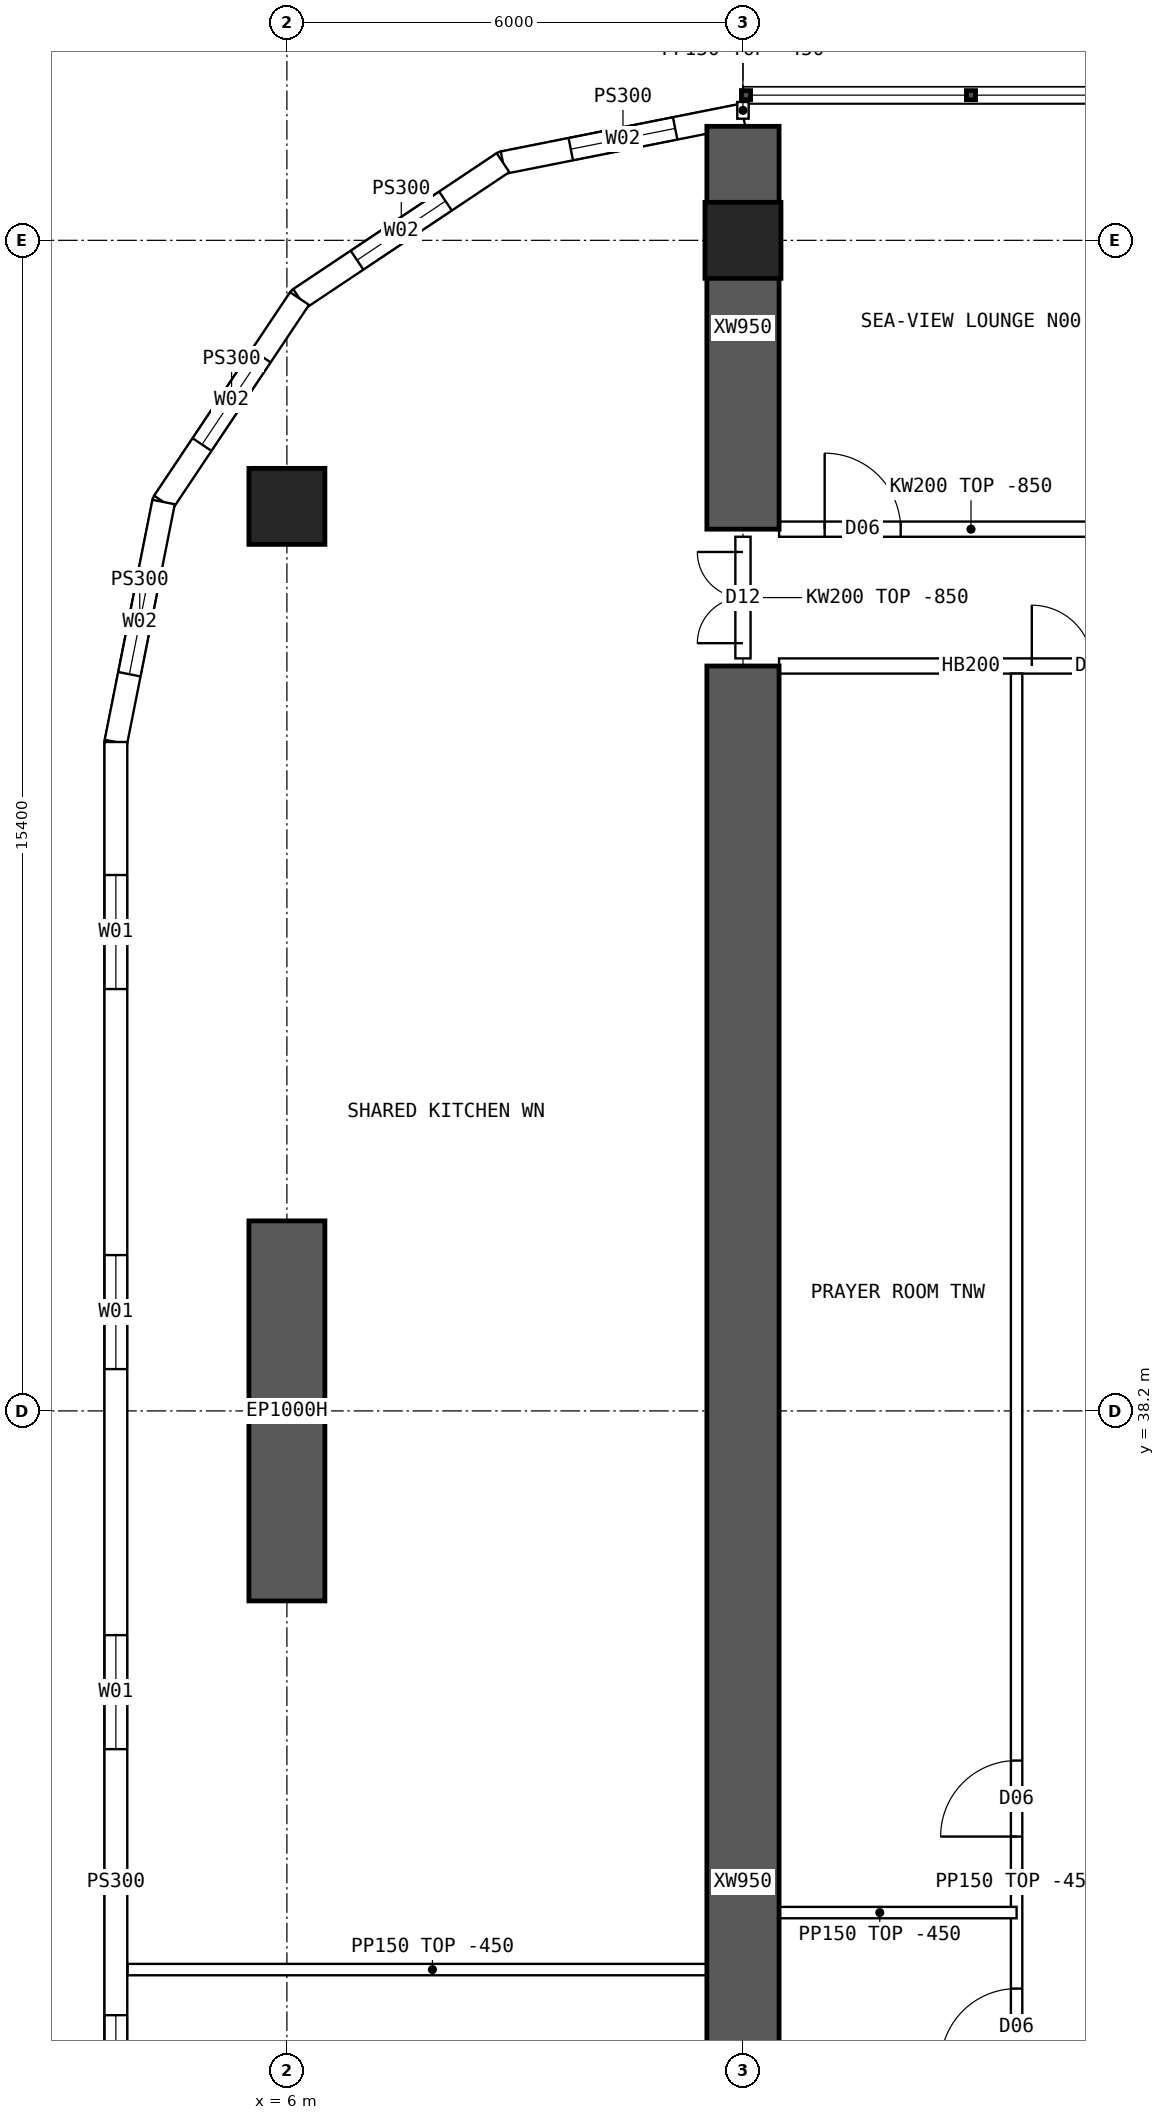
"""IFC4 building model, lengths in metres.
Left out: names, types, materials, properties, quantities, classifications, styles, units other than length and angle.
Written with IfcOpenShell. Run it as: python <this file> out.ifc"""

import sys

from ifc_helpers import new_model, si_unit, direction, frame, frame_2d, origin, origin_2d, place, context, subcontext, project, spatial, polyline, rectangle, hollow_rectangle, outline, extrude, element, fill, save


model = new_model("IFC4")
c1 = context("Model", 3, precision=1e-05, world=origin(), true_north=direction((0.0, 1.0)))
c2 = subcontext(c1, "Body", "Model", "MODEL_VIEW")
j1 = project(units=[si_unit("LENGTHUNIT", "METRE"), si_unit("PLANEANGLEUNIT", "RADIAN")], contexts=[c1])
p1 = place(None, origin())
s1 = spatial("IfcSite", under=j1, at=p1, CompositionType="ELEMENT")
p2 = place(p1, origin())
s2 = spatial("IfcBuilding", under=s1, at=p2, CompositionType="ELEMENT")
p3 = place(p2, frame((0.0, 0.0, 95.65)))
s3 = spatial("IfcBuildingStorey", under=s2, at=p3, CompositionType="ELEMENT", Elevation=95.65)
for number, where, z_axis, x_axis in (
    (1, (12.0, 53.6, 0.0), (0.0, 0.0, 1.0), (1.0, 0.0, 0.0)),
    (2, (6.0, 50.1, 0.0), (0.0, 0.0, 1.0), (1.0, 0.0, 0.0)),
):
    element("IfcColumn", number, at=place(p3, frame(where, z_axis=z_axis, x_axis=x_axis)), inside=s3, PredefinedType="COLUMN", context=c2, shape_type="SweptSolid", body=[
        extrude(hollow_rectangle(XDim=1.0, YDim=1.0, WallThickness=0.1, at=origin_2d()), origin(), (0.0, 0.0, 1.0), 3.75),
    ])
p4 = place(p3, frame((6.0, 35.7, 0.0), z_axis=(0.0, 0.0, 1.0), x_axis=(0.0, 1.0, 0.0)))
e3 = element("IfcWall", 3, at=p4, inside=s3, PredefinedType="SHEAR", context=c2, shape_type="SweptSolid", body=[
    extrude(rectangle(XDim=5.0, YDim=1.0, at=frame_2d((2.5, 0.0))), origin(), (0.0, 0.0, 1.0), 3.75),
])
p5 = place(p3, frame((12.0, 49.8, 0.0), z_axis=(0.0, 0.0, 1.0), x_axis=(0.0, 1.0, 0.0)))
e4 = element("IfcWall", 4, at=p5, inside=s3, PredefinedType="SHEAR", context=c2, shape_type="SweptSolid", body=[
    extrude(rectangle(XDim=5.3, YDim=0.95, at=frame_2d((2.65, 0.0))), origin(), (0.0, 0.0, 1.0), 3.75),
])
p6 = place(p3, frame((12.0, 16.0, 0.0), z_axis=(0.0, 0.0, 1.0), x_axis=(0.0, 1.0, 0.0)))
e5 = element("IfcWall", 5, at=p6, inside=s3, PredefinedType="SHEAR", context=c2, shape_type="SweptSolid", body=[
    extrude(rectangle(XDim=32.0, YDim=0.95, at=frame_2d((16.0, 0.0))), origin(), (0.0, 0.0, 1.0), 3.75),
])
p7 = place(p3, frame((3.75, 47.0, 0.0), z_axis=(0.0, 0.0, 1.0), x_axis=(0.0, -1.0, 0.0)))
e6 = element("IfcWall", 6, at=p7, inside=s3, PredefinedType="SOLIDWALL", context=c2, shape_type="SweptSolid", body=[
    extrude(outline(polyline([(-0.015, -0.15), (30.015, -0.15), (29.985, 0.15), (0.015, 0.15), (-0.015, -0.15)])), origin(), (0.0, 0.0, 1.0), 3.3),
])
p8 = place(p7, frame((1.75, 0.0, 0.9)))
e7 = element("IfcOpeningElement", 7, at=p8, cuts=e6, PredefinedType="OPENING", context=c2, shape_type="SweptSolid", body=[
    extrude(rectangle(XDim=1.5, YDim=2.0, at=frame_2d((0.75, 1.0))), frame((0.0, 0.16, 0.0), z_axis=(0.0, -1.0, 0.0), x_axis=(1.0, 0.0, 0.0)), (0.0, 0.0, 1.0), 0.32),
])
p9 = place(p7, frame((6.75, 0.0, 0.9)))
e8 = element("IfcOpeningElement", 8, at=p9, cuts=e6, PredefinedType="OPENING", context=c2, shape_type="SweptSolid", body=[
    extrude(rectangle(XDim=1.5, YDim=2.0, at=frame_2d((0.75, 1.0))), frame((0.0, 0.16, 0.0), z_axis=(0.0, -1.0, 0.0), x_axis=(1.0, 0.0, 0.0)), (0.0, 0.0, 1.0), 0.32),
])
p10 = place(p7, frame((11.75, 0.0, 0.9)))
e9 = element("IfcOpeningElement", 9, at=p10, cuts=e6, PredefinedType="OPENING", context=c2, shape_type="SweptSolid", body=[
    extrude(rectangle(XDim=1.5, YDim=2.0, at=frame_2d((0.75, 1.0))), frame((0.0, 0.16, 0.0), z_axis=(0.0, -1.0, 0.0), x_axis=(1.0, 0.0, 0.0)), (0.0, 0.0, 1.0), 0.32),
])
p11 = place(p7, frame((16.75, 0.0, 0.9)))
e10 = element("IfcOpeningElement", 10, at=p11, cuts=e6, PredefinedType="OPENING", context=c2, shape_type="SweptSolid", body=[
    extrude(rectangle(XDim=1.5, YDim=2.0, at=frame_2d((0.75, 1.0))), frame((0.0, 0.16, 0.0), z_axis=(0.0, -1.0, 0.0), x_axis=(1.0, 0.0, 0.0)), (0.0, 0.0, 1.0), 0.32),
])
p12 = place(p7, frame((21.75, 0.0, 0.9)))
e11 = element("IfcOpeningElement", 11, at=p12, cuts=e6, PredefinedType="OPENING", context=c2, shape_type="SweptSolid", body=[
    extrude(rectangle(XDim=1.5, YDim=2.0, at=frame_2d((0.75, 1.0))), frame((0.0, 0.16, 0.0), z_axis=(0.0, -1.0, 0.0), x_axis=(1.0, 0.0, 0.0)), (0.0, 0.0, 1.0), 0.32),
])
p13 = place(p7, frame((26.75, 0.0, 0.9)))
e12 = element("IfcOpeningElement", 12, at=p13, cuts=e6, PredefinedType="OPENING", context=c2, shape_type="SweptSolid", body=[
    extrude(rectangle(XDim=1.5, YDim=2.0, at=frame_2d((0.75, 1.0))), frame((0.0, 0.16, 0.0), z_axis=(0.0, -1.0, 0.0), x_axis=(1.0, 0.0, 0.0)), (0.0, 0.0, 1.0), 0.32),
])
p14 = place(p3, frame((12.0, 55.25, 0.0), z_axis=(0.0, 0.0, 1.0), x_axis=(-0.980787251524, -0.195080412259, 0.0)))
e13 = element("IfcWall", 13, at=p14, inside=s3, PredefinedType="SOLIDWALL", context=c2, shape_type="SweptSolid", body=[
    extrude(outline(polyline([(-0.03, -0.15), (3.249, -0.15), (3.189, 0.15), (0.03, 0.15), (-0.03, -0.15)])), origin(), (0.0, 0.0, 1.0), 3.3),
])
p15 = place(p14, frame((0.909, 0.0, 0.9)))
e14 = element("IfcOpeningElement", 14, at=p15, cuts=e13, PredefinedType="OPENING", context=c2, shape_type="SweptSolid", body=[
    extrude(rectangle(XDim=1.4, YDim=1.8, at=frame_2d((0.7, 0.9))), frame((0.0, 0.16, 0.0), z_axis=(0.0, -1.0, 0.0), x_axis=(1.0, 0.0, 0.0)), (0.0, 0.0, 1.0), 0.32),
])
p16 = place(p3, frame((8.843, 54.622, 0.0), z_axis=(0.0, 0.0, 1.0), x_axis=(-0.831443069936, -0.555609954424, 0.0)))
e15 = element("IfcWall", 15, at=p16, inside=s3, PredefinedType="SOLIDWALL", context=c2, shape_type="SweptSolid", body=[
    extrude(outline(polyline([(-0.03, -0.15), (3.249, -0.15), (3.189, 0.15), (0.03, 0.15), (-0.03, -0.15)])), origin(), (0.0, 0.0, 1.0), 3.3),
])
p17 = place(p16, frame((0.909, 0.0, 0.9)))
e16 = element("IfcOpeningElement", 16, at=p17, cuts=e15, PredefinedType="OPENING", context=c2, shape_type="SweptSolid", body=[
    extrude(rectangle(XDim=1.4, YDim=1.8, at=frame_2d((0.7, 0.9))), frame((0.0, 0.16, 0.0), z_axis=(0.0, -1.0, 0.0), x_axis=(1.0, 0.0, 0.0)), (0.0, 0.0, 1.0), 0.32),
])
p18 = place(p3, frame((6.167, 52.833, 0.0), z_axis=(0.0, 0.0, 1.0), x_axis=(-0.555609954424, -0.831443069936, 0.0)))
e17 = element("IfcWall", 17, at=p18, inside=s3, PredefinedType="SOLIDWALL", context=c2, shape_type="SweptSolid", body=[
    extrude(outline(polyline([(-0.03, -0.15), (3.249, -0.15), (3.189, 0.15), (0.03, 0.15), (-0.03, -0.15)])), origin(), (0.0, 0.0, 1.0), 3.3),
])
p19 = place(p18, frame((0.909, 0.0, 0.9)))
e18 = element("IfcOpeningElement", 18, at=p19, cuts=e17, PredefinedType="OPENING", context=c2, shape_type="SweptSolid", body=[
    extrude(rectangle(XDim=1.4, YDim=1.8, at=frame_2d((0.7, 0.9))), frame((0.0, 0.16, 0.0), z_axis=(0.0, -1.0, 0.0), x_axis=(1.0, 0.0, 0.0)), (0.0, 0.0, 1.0), 0.32),
])
p20 = place(p3, frame((4.378, 50.157, 0.0), z_axis=(0.0, 0.0, 1.0), x_axis=(-0.195080412259, -0.980787251524, 0.0)))
e19 = element("IfcWall", 19, at=p20, inside=s3, PredefinedType="SOLIDWALL", context=c2, shape_type="SweptSolid", body=[
    extrude(outline(polyline([(-0.03, -0.15), (3.234, -0.15), (3.204, 0.15), (0.03, 0.15), (-0.03, -0.15)])), origin(), (0.0, 0.0, 1.0), 3.3),
])
p21 = place(p20, frame((0.909, 0.0, 0.9)))
e20 = element("IfcOpeningElement", 20, at=p21, cuts=e19, PredefinedType="OPENING", context=c2, shape_type="SweptSolid", body=[
    extrude(rectangle(XDim=1.4, YDim=1.8, at=frame_2d((0.7, 0.9))), frame((0.0, 0.16, 0.0), z_axis=(0.0, -1.0, 0.0), x_axis=(1.0, 0.0, 0.0)), (0.0, 0.0, 1.0), 0.32),
])
p22 = place(p3, frame((12.475, 49.8, 0.0), z_axis=(0.0, 0.0, 1.0), x_axis=(1.0, 0.0, 0.0)))
e21 = element("IfcWall", 21, at=p22, inside=s3, PredefinedType="SOLIDWALL", context=c2, shape_type="SweptSolid", body=[
    extrude(outline(polyline([(0.0, 0.0), (5.05, 0.0), (5.05, 2.9), (0.0, 2.9), (0.0, 0.0)])), frame((0.0, 0.1, 0.0), z_axis=(0.0, -1.0, 0.0), x_axis=(1.0, 0.0, 0.0)), (0.0, 0.0, 1.0), 0.2),
])
p23 = place(p22, frame((0.6, 0.0, 0.0)))
e22 = element("IfcOpeningElement", 22, at=p23, cuts=e21, PredefinedType="OPENING", context=c2, shape_type="SweptSolid", body=[
    extrude(rectangle(XDim=1.0, YDim=2.1, at=frame_2d((0.5, 1.05))), frame((0.0, 0.11, 0.0), z_axis=(0.0, -1.0, 0.0), x_axis=(1.0, 0.0, 0.0)), (0.0, 0.0, 1.0), 0.22),
])
p24 = place(p3, frame((12.475, 48.0, 0.0), z_axis=(0.0, 0.0, 1.0), x_axis=(1.0, 0.0, 0.0)))
e23 = element("IfcWall", 23, at=p24, inside=s3, PredefinedType="SOLIDWALL", context=c2, shape_type="SweptSolid", body=[
    extrude(rectangle(XDim=5.05, YDim=0.2, at=frame_2d((2.525, 0.0))), origin(), (0.0, 0.0, 1.0), 3.3),
])
p25 = place(p24, frame((3.325, 0.0, 0.0)))
e24 = element("IfcOpeningElement", 24, at=p25, cuts=e23, PredefinedType="OPENING", context=c2, shape_type="SweptSolid", body=[
    extrude(rectangle(XDim=1.6, YDim=2.1, at=frame_2d((0.8, 1.05))), frame((0.0, 0.11, 0.0), z_axis=(0.0, -1.0, 0.0), x_axis=(1.0, 0.0, 0.0)), (0.0, 0.0, 1.0), 0.22),
])
p26 = place(p3, frame((15.6, 16.1, 0.0), z_axis=(0.0, 0.0, 1.0), x_axis=(0.0, 1.0, 0.0)))
e25 = element("IfcWall", 25, at=p26, inside=s3, PredefinedType="PARTITIONING", context=c2, shape_type="SweptSolid", body=[
    extrude(rectangle(XDim=31.8, YDim=0.15, at=frame_2d((15.9, 0.0))), origin(), (0.0, 0.0, 1.0), 3.3),
])
p27 = place(p26, frame((13.5, 0.0, 0.0)))
e26 = element("IfcOpeningElement", 26, at=p27, cuts=e25, PredefinedType="OPENING", context=c2, shape_type="SweptSolid", body=[
    extrude(rectangle(XDim=1.0, YDim=2.1, at=frame_2d((0.5, 1.05))), frame((0.0, 0.085, 0.0), z_axis=(0.0, -1.0, 0.0), x_axis=(1.0, 0.0, 0.0)), (0.0, 0.0, 1.0), 0.17),
])
p28 = place(p26, frame((16.5, 0.0, 0.0)))
e27 = element("IfcOpeningElement", 27, at=p28, cuts=e25, PredefinedType="OPENING", context=c2, shape_type="SweptSolid", body=[
    extrude(rectangle(XDim=1.0, YDim=2.1, at=frame_2d((0.5, 1.05))), frame((0.0, 0.085, 0.0), z_axis=(0.0, -1.0, 0.0), x_axis=(1.0, 0.0, 0.0)), (0.0, 0.0, 1.0), 0.17),
])
p29 = place(p3, frame((12.0, 31.6, 0.0), z_axis=(0.0, 0.0, 1.0), x_axis=(1.0, 0.0, 0.0)))
e28 = element("IfcWall", 28, at=p29, inside=s3, PredefinedType="PARTITIONING", context=c2, shape_type="SweptSolid", body=[
    extrude(rectangle(XDim=3.6, YDim=0.15, at=frame_2d((1.8, 0.0))), origin(), (0.0, 0.0, 1.0), 3.3),
])
p30 = place(p3, frame((3.905, 30.85, 0.0), z_axis=(0.0, 0.0, 1.0), x_axis=(1.0, 0.0, 0.0)))
e29 = element("IfcWall", 29, at=p30, inside=s3, PredefinedType="PARTITIONING", context=c2, shape_type="SweptSolid", body=[
    extrude(outline(polyline([(0.0, 0.0), (8.02, 0.0), (8.02, 3.3), (2.397, 3.3), (2.395, 2.85), (1.797, 2.85), (1.795, 3.3), (0.0, 3.3), (0.0, 0.0)])), frame((0.0, 0.075, 0.0), z_axis=(0.0, -1.0, 0.0), x_axis=(1.0, 0.0, 0.0)), (0.0, 0.0, 1.0), 0.15),
])
p31 = place(p3, frame((12.0, 48.1, 0.0), z_axis=(0.0, 0.0, 1.0), x_axis=(0.0, 1.0, 0.0)))
e30 = element("IfcWall", 30, at=p31, inside=s3, PredefinedType="SOLIDWALL", context=c2, shape_type="SweptSolid", body=[
    extrude(outline(polyline([(0.0, 0.0), (1.6, 0.0), (1.6, 2.9), (0.0, 2.9), (0.0, 0.0)])), frame((0.0, 0.1, 0.0), z_axis=(0.0, -1.0, 0.0), x_axis=(1.0, 0.0, 0.0)), (0.0, 0.0, 1.0), 0.2),
])
p32 = place(p31, frame((0.2, 0.0, 0.0)))
e31 = element("IfcOpeningElement", 31, at=p32, cuts=e30, PredefinedType="OPENING", context=c2, shape_type="SweptSolid", body=[
    extrude(rectangle(XDim=1.2, YDim=2.1, at=frame_2d((0.6, 1.05))), frame((0.0, 0.11, 0.0), z_axis=(0.0, -1.0, 0.0), x_axis=(1.0, 0.0, 0.0)), (0.0, 0.0, 1.0), 0.22),
])
p33 = place(p3, frame((12.0, 55.2, 0.0), z_axis=(0.0, 0.0, 1.0), x_axis=(0.0, 1.0, 0.0)))
e32 = element("IfcWall", 32, at=p33, inside=s3, PredefinedType="PARTITIONING", context=c2, shape_type="SweptSolid", body=[
    extrude(rectangle(XDim=0.22, YDim=0.15, at=frame_2d((0.11, 0.0))), origin(), (0.0, 0.0, 1.0), 3.3),
])
p34 = place(p8, origin())
e33 = element("IfcWindow", 33, at=p34, inside=s3, PartitioningType="SINGLE_PANEL", PredefinedType="WINDOW", context=c2, shape_type="SweptSolid", body=[
    extrude(rectangle(XDim=1.5, YDim=2.0, at=frame_2d((0.75, 1.0))), frame((0.0, 0.03, 0.0), z_axis=(0.0, -1.0, 0.0), x_axis=(1.0, 0.0, 0.0)), (0.0, 0.0, 1.0), 0.06),
])
fill(e7, e33)
p35 = place(p9, origin())
e34 = element("IfcWindow", 34, at=p35, inside=s3, PartitioningType="SINGLE_PANEL", PredefinedType="WINDOW", context=c2, shape_type="SweptSolid", body=[
    extrude(rectangle(XDim=1.5, YDim=2.0, at=frame_2d((0.75, 1.0))), frame((0.0, 0.03, 0.0), z_axis=(0.0, -1.0, 0.0), x_axis=(1.0, 0.0, 0.0)), (0.0, 0.0, 1.0), 0.06),
])
fill(e8, e34)
p36 = place(p10, origin())
e35 = element("IfcWindow", 35, at=p36, inside=s3, PartitioningType="SINGLE_PANEL", PredefinedType="WINDOW", context=c2, shape_type="SweptSolid", body=[
    extrude(rectangle(XDim=1.5, YDim=2.0, at=frame_2d((0.75, 1.0))), frame((0.0, 0.03, 0.0), z_axis=(0.0, -1.0, 0.0), x_axis=(1.0, 0.0, 0.0)), (0.0, 0.0, 1.0), 0.06),
])
fill(e9, e35)
p37 = place(p11, origin())
e36 = element("IfcWindow", 36, at=p37, inside=s3, PartitioningType="SINGLE_PANEL", PredefinedType="WINDOW", context=c2, shape_type="SweptSolid", body=[
    extrude(rectangle(XDim=1.5, YDim=2.0, at=frame_2d((0.75, 1.0))), frame((0.0, 0.03, 0.0), z_axis=(0.0, -1.0, 0.0), x_axis=(1.0, 0.0, 0.0)), (0.0, 0.0, 1.0), 0.06),
])
fill(e10, e36)
p38 = place(p15, origin())
e37 = element("IfcWindow", 37, at=p38, inside=s3, PartitioningType="SINGLE_PANEL", PredefinedType="WINDOW", context=c2, shape_type="SweptSolid", body=[
    extrude(rectangle(XDim=1.4, YDim=1.8, at=frame_2d((0.7, 0.9))), frame((0.0, 0.03, 0.0), z_axis=(0.0, -1.0, 0.0), x_axis=(1.0, 0.0, 0.0)), (0.0, 0.0, 1.0), 0.06),
])
fill(e14, e37)
p39 = place(p17, origin())
e38 = element("IfcWindow", 38, at=p39, inside=s3, PartitioningType="SINGLE_PANEL", PredefinedType="WINDOW", context=c2, shape_type="SweptSolid", body=[
    extrude(rectangle(XDim=1.4, YDim=1.8, at=frame_2d((0.7, 0.9))), frame((0.0, 0.03, 0.0), z_axis=(0.0, -1.0, 0.0), x_axis=(1.0, 0.0, 0.0)), (0.0, 0.0, 1.0), 0.06),
])
fill(e16, e38)
p40 = place(p19, origin())
e39 = element("IfcWindow", 39, at=p40, inside=s3, PartitioningType="SINGLE_PANEL", PredefinedType="WINDOW", context=c2, shape_type="SweptSolid", body=[
    extrude(rectangle(XDim=1.4, YDim=1.8, at=frame_2d((0.7, 0.9))), frame((0.0, 0.03, 0.0), z_axis=(0.0, -1.0, 0.0), x_axis=(1.0, 0.0, 0.0)), (0.0, 0.0, 1.0), 0.06),
])
fill(e18, e39)
p41 = place(p21, origin())
e40 = element("IfcWindow", 40, at=p41, inside=s3, PartitioningType="SINGLE_PANEL", PredefinedType="WINDOW", context=c2, shape_type="SweptSolid", body=[
    extrude(rectangle(XDim=1.4, YDim=1.8, at=frame_2d((0.7, 0.9))), frame((0.0, 0.03, 0.0), z_axis=(0.0, -1.0, 0.0), x_axis=(1.0, 0.0, 0.0)), (0.0, 0.0, 1.0), 0.06),
])
fill(e20, e40)
p42 = place(p25, origin())
e41 = element("IfcDoor", 41, at=p42, inside=s3, OperationType="DOUBLE_DOOR_SINGLE_SWING", PredefinedType="DOOR", context=c2, shape_type="SweptSolid", body=[
    extrude(rectangle(XDim=1.6, YDim=2.1, at=frame_2d((0.8, 1.05))), frame((0.0, 0.025, 0.0), z_axis=(0.0, -1.0, 0.0), x_axis=(1.0, 0.0, 0.0)), (0.0, 0.0, 1.0), 0.05),
])
fill(e24, e41)
p43 = place(p23, origin())
e42 = element("IfcDoor", 42, at=p43, inside=s3, OperationType="SINGLE_SWING_LEFT", PredefinedType="DOOR", context=c2, shape_type="SweptSolid", body=[
    extrude(rectangle(XDim=1.0, YDim=2.1, at=frame_2d((0.5, 1.05))), frame((0.0, 0.025, 0.0), z_axis=(0.0, -1.0, 0.0), x_axis=(1.0, 0.0, 0.0)), (0.0, 0.0, 1.0), 0.05),
])
fill(e22, e42)
p44 = place(p27, origin())
e43 = element("IfcDoor", 43, at=p44, inside=s3, OperationType="SINGLE_SWING_LEFT", PredefinedType="DOOR", context=c2, shape_type="SweptSolid", body=[
    extrude(rectangle(XDim=1.0, YDim=2.1, at=frame_2d((0.5, 1.05))), frame((0.0, 0.025, 0.0), z_axis=(0.0, -1.0, 0.0), x_axis=(1.0, 0.0, 0.0)), (0.0, 0.0, 1.0), 0.05),
])
fill(e26, e43)
p45 = place(p28, origin())
e44 = element("IfcDoor", 44, at=p45, inside=s3, OperationType="SINGLE_SWING_LEFT", PredefinedType="DOOR", context=c2, shape_type="SweptSolid", body=[
    extrude(rectangle(XDim=1.0, YDim=2.1, at=frame_2d((0.5, 1.05))), frame((0.0, 0.025, 0.0), z_axis=(0.0, -1.0, 0.0), x_axis=(1.0, 0.0, 0.0)), (0.0, 0.0, 1.0), 0.05),
])
fill(e27, e44)
p46 = place(p32, origin())
e45 = element("IfcDoor", 45, at=p46, inside=s3, OperationType="DOUBLE_DOOR_SINGLE_SWING", PredefinedType="DOOR", context=c2, shape_type="SweptSolid", body=[
    extrude(rectangle(XDim=1.2, YDim=2.1, at=frame_2d((0.6, 1.05))), frame((0.0, 0.025, 0.0), z_axis=(0.0, -1.0, 0.0), x_axis=(1.0, 0.0, 0.0)), (0.0, 0.0, 1.0), 0.05),
])
fill(e31, e45)
save(model, sys.argv[1])
